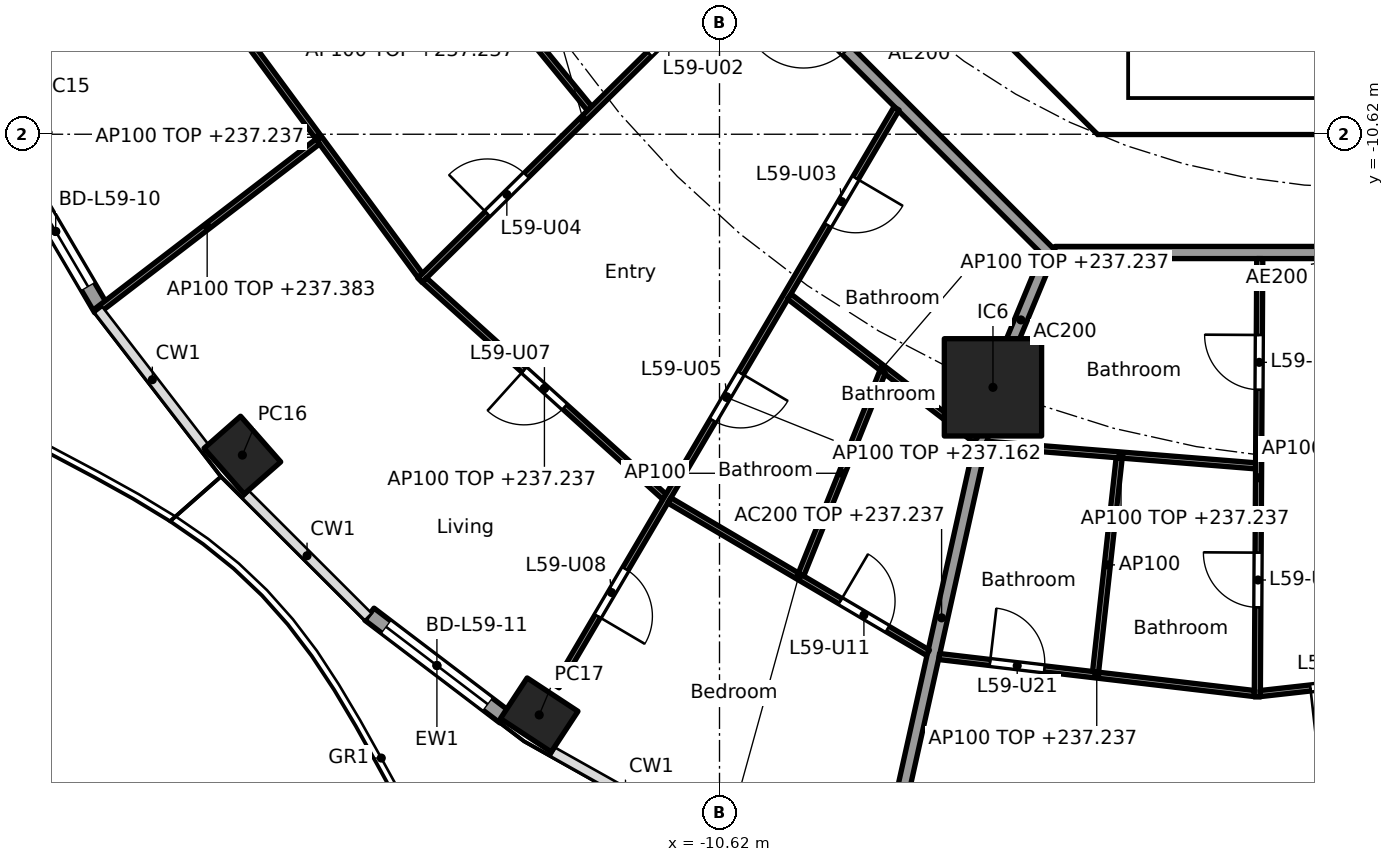
"""IFC4 building model, lengths in metres.
Left out: names, types, materials, properties, quantities, classifications, styles, units other than length and angle.
Written with IfcOpenShell. Run it as: python <this file> out.ifc"""

import sys

from ifc_helpers import new_model, si_unit, direction, frame, frame_2d, origin, origin_2d, place, context, subcontext, project, spatial, polyline, rectangle, hollow_rectangle, outline, extrude, element, fill, save


model = new_model("IFC4")
c1 = context("Model", 3, precision=1e-05, world=origin(), true_north=direction((0.0, 1.0)))
c2 = subcontext(c1, "Body", "Model", "MODEL_VIEW")
j1 = project(units=[si_unit("LENGTHUNIT", "METRE"), si_unit("PLANEANGLEUNIT", "RADIAN")], contexts=[c1])
p1 = place(None, origin())
s1 = spatial("IfcSite", under=j1, at=p1, CompositionType="ELEMENT")
p2 = place(p1, origin())
s2 = spatial("IfcBuilding", under=s1, at=p2, CompositionType="ELEMENT")
p3 = place(p2, frame((0.0, 0.0, 234.4)))
s3 = spatial("IfcBuildingStorey", under=s2, at=p3, CompositionType="ELEMENT", Elevation=234.4)
for number, where, z_axis, x_axis in (
    (1, (-18.467, -15.896, 0.0), (0.0, 0.0, 1.0), (0.66, -0.751, 0.0)),
    (2, (-13.585, -20.17, 0.0), (0.0, 0.0, 1.0), (0.836, -0.549, 0.0)),
):
    element("IfcColumn", number, at=place(p3, frame(where, z_axis=z_axis, x_axis=x_axis)), inside=s3, PredefinedType="COLUMN", context=c2, shape_type="SweptSolid", body=[
        extrude(hollow_rectangle(XDim=1.0, YDim=0.8, WallThickness=0.032, at=origin_2d()), origin(), (0.0, 0.0, 1.0), 3.7),
    ])
p4 = place(p3, frame((-6.123, -14.782, 0.0), z_axis=(0.0, 0.0, 1.0), x_axis=(1.0, 0.0, 0.0)))
e3 = element("IfcColumn", 3, at=p4, inside=s3, PredefinedType="COLUMN", context=c2, shape_type="SweptSolid", body=[
    extrude(rectangle(XDim=1.6, YDim=1.6, at=origin_2d()), origin(), (0.0, 0.0, 1.0), 3.7),
])
p5 = place(p3, frame((-20.788, -13.493, 0.0), z_axis=(0.0, 0.0, 1.0), x_axis=(-0.506294090973, 0.862360883532, 0.0)))
e4 = element("IfcWall", 4, at=p5, inside=s3, PredefinedType="SOLIDWALL", context=c2, shape_type="SweptSolid", body=[
    extrude(rectangle(XDim=2.955, YDim=0.25, at=frame_2d((1.477, 0.0))), origin(), (0.0, 0.0, 1.0), 3.44),
])
p6 = place(p5, frame((0.427, 0.0, 0.0)))
e5 = element("IfcOpeningElement", 5, at=p6, cuts=e4, PredefinedType="OPENING", context=c2, shape_type="SweptSolid", body=[
    extrude(rectangle(XDim=2.1, YDim=2.4, at=frame_2d((1.05, 1.2))), frame((0.0, 0.135, 0.0), z_axis=(0.0, -1.0, 0.0), x_axis=(1.0, 0.0, 0.0)), (0.0, 0.0, 1.0), 0.27),
])
p7 = place(p3, frame((-14.157, -20.201, 0.0), z_axis=(0.0, 0.0, 1.0), x_axis=(-0.795990084031, 0.60530966135, 0.0)))
e6 = element("IfcWall", 6, at=p7, inside=s3, PredefinedType="SOLIDWALL", context=c2, shape_type="SweptSolid", body=[
    extrude(rectangle(XDim=2.789, YDim=0.25, at=frame_2d((1.394, 0.0))), origin(), (0.0, 0.0, 1.0), 3.44),
])
p8 = place(p7, frame((0.344, 0.0, 0.0)))
e7 = element("IfcOpeningElement", 7, at=p8, cuts=e6, PredefinedType="OPENING", context=c2, shape_type="SweptSolid", body=[
    extrude(rectangle(XDim=2.1, YDim=2.4, at=frame_2d((1.05, 1.2))), frame((0.0, 0.135, 0.0), z_axis=(0.0, -1.0, 0.0), x_axis=(1.0, 0.0, 0.0)), (0.0, 0.0, 1.0), 0.27),
])
p9 = place(p3, frame((-9.988, -4.613, 0.0), z_axis=(0.0, 0.0, 1.0), x_axis=(0.707106781187, -0.707106781187, 0.0)))
e8 = element("IfcWall", 8, at=p9, inside=s3, PredefinedType="SHEAR", context=c2, shape_type="SweptSolid", body=[
    extrude(rectangle(XDim=7.602, YDim=0.6, at=frame_2d((3.801, 0.0))), origin(), (0.0, 0.0, 1.0), 3.44),
])
p10 = place(p9, frame((6.151, 0.0, 0.0)))
e9 = element("IfcOpeningElement", 9, at=p10, cuts=e8, PredefinedType="OPENING", context=c2, shape_type="SweptSolid", body=[
    extrude(rectangle(XDim=1.1, YDim=2.1, at=frame_2d((0.55, 1.05))), frame((0.0, 0.31, 0.0), z_axis=(0.0, -1.0, 0.0), x_axis=(1.0, 0.0, 0.0)), (0.0, 0.0, 1.0), 0.62),
])
p11 = place(p3, origin())
e10 = element("IfcWall", 10, at=p11, inside=s3, PredefinedType="SHEAR", context=c2, shape_type="SweptSolid", body=[
    extrude(outline(polyline([(-4.152, -10.025), (4.152, -10.025), (4.401, -9.776), (4.825, -10.2), (4.401, -10.625), (-4.401, -10.625), (-4.825, -10.2), (-4.401, -9.776), (-4.152, -10.025)])), origin(), (0.0, 0.0, 1.0), 3.44),
])
p12 = place(p3, origin())
e11 = element("IfcWall", 11, at=p12, inside=s3, PredefinedType="SOLIDWALL", context=c2, shape_type="SweptSolid", body=[
    extrude(outline(polyline([(-3.9, -10.025), (-4.1, -10.025), (-4.1, -7.025), (-3.9, -7.025), (-3.9, -10.025)])), origin(), (0.0, 0.0, 1.0), 3.44),
])
p13 = place(p3, frame((-5.243, -12.657, 0.0), z_axis=(0.0, 0.0, 1.0), x_axis=(-0.382691608661, -0.923876145736, 0.0)))
e12 = element("IfcWall", 12, at=p13, inside=s3, PredefinedType="PARTITIONING", context=c2, shape_type="SweptSolid", body=[
    extrude(rectangle(XDim=2.2, YDim=0.2, at=frame_2d((1.1, 0.0))), origin(), (0.0, 0.0, 1.0), 3.44),
])
p14 = place(p3, frame((-6.134, -14.831, 0.0), z_axis=(0.0, 0.0, 1.0), x_axis=(-0.217500172543, -0.976060282433, 0.0)))
e13 = element("IfcWall", 13, at=p14, inside=s3, PredefinedType="PARTITIONING", context=c2, shape_type="SweptSolid", body=[
    extrude(rectangle(XDim=7.668, YDim=0.2, at=frame_2d((3.834, 0.0))), origin(), (0.0, 0.0, 1.0), 2.837),
])
p15 = place(p3, frame((-12.635, -5.134, 0.0), z_axis=(0.0, 0.0, 1.0), x_axis=(0.707106781187, -0.707106781187, 0.0)))
e14 = element("IfcWall", 14, at=p15, inside=s3, PredefinedType="PARTITIONING", context=c2, shape_type="SweptSolid", body=[
    extrude(rectangle(XDim=10.609, YDim=0.2, at=frame_2d((5.305, 0.0))), origin(), (0.0, 0.0, 1.0), 3.44),
])
p16 = place(p15, frame((4.804, 0.0, 0.0)))
e15 = element("IfcOpeningElement", 15, at=p16, cuts=e14, PredefinedType="OPENING", context=c2, shape_type="SweptSolid", body=[
    extrude(rectangle(XDim=1.0, YDim=2.1, at=frame_2d((0.5, 1.05))), frame((0.0, 0.11, 0.0), z_axis=(0.0, -1.0, 0.0), x_axis=(1.0, 0.0, 0.0)), (0.0, 0.0, 1.0), 0.22),
])
p17 = place(p3, frame((-5.104, -12.565, 0.0), z_axis=(0.0, 0.0, 1.0), x_axis=(1.0, 0.0, 0.0)))
e16 = element("IfcWall", 16, at=p17, inside=s3, PredefinedType="PARTITIONING", context=c2, shape_type="SweptSolid", body=[
    extrude(rectangle(XDim=10.409, YDim=0.2, at=frame_2d((5.205, 0.0))), origin(), (0.0, 0.0, 1.0), 3.44),
])
p18 = place(p17, frame((4.604, 0.0, 0.0)))
e17 = element("IfcOpeningElement", 17, at=p18, cuts=e16, PredefinedType="OPENING", context=c2, shape_type="SweptSolid", body=[
    extrude(rectangle(XDim=1.0, YDim=2.1, at=frame_2d((0.5, 1.05))), frame((0.0, 0.11, 0.0), z_axis=(0.0, -1.0, 0.0), x_axis=(1.0, 0.0, 0.0)), (0.0, 0.0, 1.0), 0.22),
])
p19 = place(p3, frame((-15.711, -6.593, 0.0), z_axis=(0.0, 0.0, 1.0), x_axis=(0.634058916642, -0.773284740718, 0.0)))
e18 = element("IfcWall", 18, at=p19, inside=s3, PredefinedType="PARTITIONING", context=c2, shape_type="SweptSolid", body=[
    extrude(rectangle(XDim=4.661, YDim=0.1, at=frame_2d((2.331, 0.0))), origin(), (0.0, 0.0, 1.0), 2.837),
])
p20 = place(p3, frame((-18.893, -8.395, 0.0), z_axis=(0.0, 0.0, 1.0), x_axis=(0.593212299255, -0.80504606577, 0.0)))
e19 = element("IfcWall", 19, at=p20, inside=s3, PredefinedType="PARTITIONING", context=c2, shape_type="SweptSolid", body=[
    extrude(rectangle(XDim=5.652, YDim=0.1, at=frame_2d((2.826, 0.0))), origin(), (0.0, 0.0, 1.0), 2.837),
])
p21 = place(p3, frame((-17.227, -10.74, 0.0), z_axis=(0.0, 0.0, 1.0), x_axis=(-0.793312316411, -0.60881488864, 0.0)))
e20 = element("IfcWall", 20, at=p21, inside=s3, PredefinedType="PARTITIONING", context=c2, shape_type="SweptSolid", body=[
    extrude(rectangle(XDim=4.585, YDim=0.1, at=frame_2d((2.292, 0.0))), origin(), (0.0, 0.0, 1.0), 2.983),
])
p22 = place(p3, frame((-10.183, -7.728, 0.0), z_axis=(0.0, 0.0, 1.0), x_axis=(-0.711869910979, -0.702311348223, 0.0)))
e21 = element("IfcWall", 21, at=p22, inside=s3, PredefinedType="PARTITIONING", context=c2, shape_type="SweptSolid", body=[
    extrude(rectangle(XDim=7.535, YDim=0.1, at=frame_2d((3.767, 0.0))), origin(), (0.0, 0.0, 1.0), 2.762),
])
p23 = place(p22, frame((1.335, 0.0, 0.0)))
e22 = element("IfcOpeningElement", 22, at=p23, cuts=e21, PredefinedType="OPENING", context=c2, shape_type="SweptSolid", body=[
    extrude(rectangle(XDim=0.9, YDim=2.1, at=frame_2d((0.45, 1.05))), frame((0.0, 0.06, 0.0), z_axis=(0.0, -1.0, 0.0), x_axis=(1.0, 0.0, 0.0)), (0.0, 0.0, 1.0), 0.12),
])
p24 = place(p22, frame((5.077, 0.0, 0.0)))
e23 = element("IfcOpeningElement", 23, at=p24, cuts=e21, PredefinedType="OPENING", context=c2, shape_type="SweptSolid", body=[
    extrude(rectangle(XDim=0.9, YDim=2.1, at=frame_2d((0.45, 1.05))), frame((0.0, 0.06, 0.0), z_axis=(0.0, -1.0, 0.0), x_axis=(1.0, 0.0, 0.0)), (0.0, 0.0, 1.0), 0.12),
])
p25 = place(p3, frame((-15.474, -13.019, 0.0), z_axis=(0.0, 0.0, 1.0), x_axis=(0.742348572616, -0.670013878017, 0.0)))
e24 = element("IfcWall", 24, at=p25, inside=s3, PredefinedType="PARTITIONING", context=c2, shape_type="SweptSolid", body=[
    extrude(rectangle(XDim=5.319, YDim=0.1, at=frame_2d((2.66, 0.0))), origin(), (0.0, 0.0, 1.0), 2.837),
])
p26 = place(p25, frame((2.21, 0.0, 0.0)))
e25 = element("IfcOpeningElement", 25, at=p26, cuts=e24, PredefinedType="OPENING", context=c2, shape_type="SweptSolid", body=[
    extrude(rectangle(XDim=0.9, YDim=2.1, at=frame_2d((0.45, 1.05))), frame((0.0, 0.06, 0.0), z_axis=(0.0, -1.0, 0.0), x_axis=(1.0, 0.0, 0.0)), (0.0, 0.0, 1.0), 0.12),
])
p27 = place(p3, frame((-7.709, -10.198, 0.0), z_axis=(0.0, 0.0, 1.0), x_axis=(-0.507355901053, -0.8617366127, 0.0)))
e26 = element("IfcWall", 26, at=p27, inside=s3, PredefinedType="PARTITIONING", context=c2, shape_type="SweptSolid", body=[
    extrude(rectangle(XDim=11.025, YDim=0.1, at=frame_2d((5.512, 0.0))), origin(), (0.0, 0.0, 1.0), 2.762),
])
p28 = place(p27, frame((1.326, 0.0, 0.0)))
e27 = element("IfcOpeningElement", 27, at=p28, cuts=e26, PredefinedType="OPENING", context=c2, shape_type="SweptSolid", body=[
    extrude(rectangle(XDim=0.9, YDim=2.1, at=frame_2d((0.45, 1.05))), frame((0.0, 0.06, 0.0), z_axis=(0.0, -1.0, 0.0), x_axis=(1.0, 0.0, 0.0)), (0.0, 0.0, 1.0), 0.12),
])
p29 = place(p27, frame((5.05, 0.0, 0.0)))
e28 = element("IfcOpeningElement", 28, at=p29, cuts=e26, PredefinedType="OPENING", context=c2, shape_type="SweptSolid", body=[
    extrude(rectangle(XDim=0.9, YDim=2.1, at=frame_2d((0.45, 1.05))), frame((0.0, 0.06, 0.0), z_axis=(0.0, -1.0, 0.0), x_axis=(1.0, 0.0, 0.0)), (0.0, 0.0, 1.0), 0.12),
])
p30 = place(p27, frame((8.787, 0.0, 0.0)))
e29 = element("IfcOpeningElement", 29, at=p30, cuts=e26, PredefinedType="OPENING", context=c2, shape_type="SweptSolid", body=[
    extrude(rectangle(XDim=0.9, YDim=2.1, at=frame_2d((0.45, 1.05))), frame((0.0, 0.06, 0.0), z_axis=(0.0, -1.0, 0.0), x_axis=(1.0, 0.0, 0.0)), (0.0, 0.0, 1.0), 0.12),
])
p31 = place(p3, frame((-9.471, -13.289, 0.0), z_axis=(0.0, 0.0, 1.0), x_axis=(0.792227074489, -0.610226402614, 0.0)))
e30 = element("IfcWall", 30, at=p31, inside=s3, PredefinedType="PARTITIONING", context=c2, shape_type="SweptSolid", body=[
    extrude(rectangle(XDim=3.866, YDim=0.1, at=frame_2d((1.933, 0.0))), origin(), (0.0, 0.0, 1.0), 2.837),
])
p32 = place(p3, frame((-11.445, -16.641, 0.0), z_axis=(0.0, 0.0, 1.0), x_axis=(0.861568986754, -0.507640503766, 0.0)))
e31 = element("IfcWall", 31, at=p32, inside=s3, PredefinedType="PARTITIONING", context=c2, shape_type="SweptSolid", body=[
    extrude(rectangle(XDim=4.935, YDim=0.1, at=frame_2d((2.467, 0.0))), origin(), (0.0, 0.0, 1.0), 2.837),
])
p33 = place(p32, frame((3.264, 0.0, 0.0)))
e32 = element("IfcOpeningElement", 32, at=p33, cuts=e31, PredefinedType="OPENING", context=c2, shape_type="SweptSolid", body=[
    extrude(rectangle(XDim=0.9, YDim=2.1, at=frame_2d((0.45, 1.05))), frame((0.0, 0.06, 0.0), z_axis=(0.0, -1.0, 0.0), x_axis=(1.0, 0.0, 0.0)), (0.0, 0.0, 1.0), 0.12),
])
p34 = place(p3, frame((-7.939, -14.531, 0.0), z_axis=(0.0, 0.0, 1.0), x_axis=(-0.373254758443, -0.927728885666, 0.0)))
e33 = element("IfcWall", 33, at=p34, inside=s3, PredefinedType="PARTITIONING", context=c2, shape_type="SweptSolid", body=[
    extrude(rectangle(XDim=3.589, YDim=0.1, at=frame_2d((1.794, 0.0))), origin(), (0.0, 0.0, 1.0), 3.44),
])
p35 = place(p3, frame((-6.23, -15.717, 0.0), z_axis=(0.0, 0.0, 1.0), x_axis=(0.996785662802, -0.080114558181, 0.0)))
e34 = element("IfcWall", 34, at=p35, inside=s3, PredefinedType="PARTITIONING", context=c2, shape_type="SweptSolid", body=[
    extrude(rectangle(XDim=4.44, YDim=0.1, at=frame_2d((2.22, 0.0))), origin(), (0.0, 0.0, 1.0), 2.837),
])
p36 = place(p3, frame((-7.008, -19.209, 0.0), z_axis=(0.0, 0.0, 1.0), x_axis=(0.993174535364, -0.116637653885, 0.0)))
e35 = element("IfcWall", 35, at=p36, inside=s3, PredefinedType="PARTITIONING", context=c2, shape_type="SweptSolid", body=[
    extrude(rectangle(XDim=5.218, YDim=0.1, at=frame_2d((2.609, 0.0))), origin(), (0.0, 0.0, 1.0), 2.837),
])
p37 = place(p36, frame((0.842, 0.0, 0.0)))
e36 = element("IfcOpeningElement", 36, at=p37, cuts=e35, PredefinedType="OPENING", context=c2, shape_type="SweptSolid", body=[
    extrude(rectangle(XDim=0.9, YDim=2.1, at=frame_2d((0.45, 1.05))), frame((0.0, 0.06, 0.0), z_axis=(0.0, -1.0, 0.0), x_axis=(1.0, 0.0, 0.0)), (0.0, 0.0, 1.0), 0.12),
])
p38 = place(p3, frame((-4.047, -15.943, 0.0), z_axis=(0.0, 0.0, 1.0), x_axis=(-0.109681942509, -0.993966735604, 0.0)))
e37 = element("IfcWall", 37, at=p38, inside=s3, PredefinedType="PARTITIONING", context=c2, shape_type="SweptSolid", body=[
    extrude(rectangle(XDim=3.539, YDim=0.1, at=frame_2d((1.77, 0.0))), origin(), (0.0, 0.0, 1.0), 3.44),
])
p39 = place(p3, frame((-1.735, -12.665, 0.0), z_axis=(0.0, 0.0, 1.0), x_axis=(-0.005554152823, -0.999984575574, 0.0)))
e38 = element("IfcWall", 38, at=p39, inside=s3, PredefinedType="PARTITIONING", context=c2, shape_type="SweptSolid", body=[
    extrude(rectangle(XDim=7.209, YDim=0.1, at=frame_2d((3.604, 0.0))), origin(), (0.0, 0.0, 1.0), 2.762),
])
p40 = place(p39, frame((1.256, 0.0, 0.0)))
e39 = element("IfcOpeningElement", 39, at=p40, cuts=e38, PredefinedType="OPENING", context=c2, shape_type="SweptSolid", body=[
    extrude(rectangle(XDim=0.9, YDim=2.1, at=frame_2d((0.45, 1.05))), frame((0.0, 0.06, 0.0), z_axis=(0.0, -1.0, 0.0), x_axis=(1.0, 0.0, 0.0)), (0.0, 0.0, 1.0), 0.12),
])
p41 = place(p39, frame((4.836, 0.0, 0.0)))
e40 = element("IfcOpeningElement", 40, at=p41, cuts=e38, PredefinedType="OPENING", context=c2, shape_type="SweptSolid", body=[
    extrude(rectangle(XDim=0.9, YDim=2.1, at=frame_2d((0.45, 1.05))), frame((0.0, 0.06, 0.0), z_axis=(0.0, -1.0, 0.0), x_axis=(1.0, 0.0, 0.0)), (0.0, 0.0, 1.0), 0.12),
])
p42 = place(p3, frame((-1.726, -19.818, 0.0), z_axis=(0.0, 0.0, 1.0), x_axis=(0.99381893047, 0.111013212902, 0.0)))
e41 = element("IfcWall", 41, at=p42, inside=s3, PredefinedType="PARTITIONING", context=c2, shape_type="SweptSolid", body=[
    extrude(rectangle(XDim=5.113, YDim=0.1, at=frame_2d((2.557, 0.0))), origin(), (0.0, 0.0, 1.0), 2.837),
])
p43 = place(p42, frame((0.828, 0.0, 0.0)))
e42 = element("IfcOpeningElement", 42, at=p43, cuts=e41, PredefinedType="OPENING", context=c2, shape_type="SweptSolid", body=[
    extrude(rectangle(XDim=0.9, YDim=2.1, at=frame_2d((0.45, 1.05))), frame((0.0, 0.06, 0.0), z_axis=(0.0, -1.0, 0.0), x_axis=(1.0, 0.0, 0.0)), (0.0, 0.0, 1.0), 0.12),
])
p44 = place(p6, origin())
e43 = element("IfcDoor", 43, at=p44, inside=s3, OperationType="SLIDING_TO_LEFT", PredefinedType="DOOR", context=c2, shape_type="SweptSolid", body=[
    extrude(rectangle(XDim=2.1, YDim=2.4, at=frame_2d((1.05, 1.2))), frame((0.0, 0.025, 0.0), z_axis=(0.0, -1.0, 0.0), x_axis=(1.0, 0.0, 0.0)), (0.0, 0.0, 1.0), 0.05),
])
fill(e5, e43)
p45 = place(p8, origin())
e44 = element("IfcDoor", 44, at=p45, inside=s3, OperationType="SLIDING_TO_LEFT", PredefinedType="DOOR", context=c2, shape_type="SweptSolid", body=[
    extrude(rectangle(XDim=2.1, YDim=2.4, at=frame_2d((1.05, 1.2))), frame((0.0, 0.025, 0.0), z_axis=(0.0, -1.0, 0.0), x_axis=(1.0, 0.0, 0.0)), (0.0, 0.0, 1.0), 0.05),
])
fill(e7, e44)
p46 = place(p10, origin())
e45 = element("IfcDoor", 45, at=p46, inside=s3, OperationType="SINGLE_SWING_LEFT", PredefinedType="DOOR", context=c2, shape_type="SweptSolid", body=[
    extrude(rectangle(XDim=1.1, YDim=2.1, at=frame_2d((0.55, 1.05))), frame((0.0, 0.025, 0.0), z_axis=(0.0, -1.0, 0.0), x_axis=(1.0, 0.0, 0.0)), (0.0, 0.0, 1.0), 0.05),
])
fill(e9, e45)
p47 = place(p23, frame((0.9, 0.0, 0.0), x_axis=(-1.0, 0.0, 0.0)))
e46 = element("IfcDoor", 46, at=p47, inside=s3, OperationType="SINGLE_SWING_LEFT", PredefinedType="DOOR", context=c2, shape_type="SweptSolid", body=[
    extrude(rectangle(XDim=0.9, YDim=2.1, at=frame_2d((0.45, 1.05))), frame((0.0, 0.025, 0.0), z_axis=(0.0, -1.0, 0.0), x_axis=(1.0, 0.0, 0.0)), (0.0, 0.0, 1.0), 0.05),
])
fill(e22, e46)
p48 = place(p28, origin())
e47 = element("IfcDoor", 47, at=p48, inside=s3, OperationType="SINGLE_SWING_LEFT", PredefinedType="DOOR", context=c2, shape_type="SweptSolid", body=[
    extrude(rectangle(XDim=0.9, YDim=2.1, at=frame_2d((0.45, 1.05))), frame((0.0, 0.025, 0.0), z_axis=(0.0, -1.0, 0.0), x_axis=(1.0, 0.0, 0.0)), (0.0, 0.0, 1.0), 0.05),
])
fill(e27, e47)
p49 = place(p24, frame((0.9, 0.0, 0.0), x_axis=(-1.0, 0.0, 0.0)))
e48 = element("IfcDoor", 48, at=p49, inside=s3, OperationType="SINGLE_SWING_LEFT", PredefinedType="DOOR", context=c2, shape_type="SweptSolid", body=[
    extrude(rectangle(XDim=0.9, YDim=2.1, at=frame_2d((0.45, 1.05))), frame((0.0, 0.025, 0.0), z_axis=(0.0, -1.0, 0.0), x_axis=(1.0, 0.0, 0.0)), (0.0, 0.0, 1.0), 0.05),
])
fill(e23, e48)
p50 = place(p29, origin())
e49 = element("IfcDoor", 49, at=p50, inside=s3, OperationType="SINGLE_SWING_LEFT", PredefinedType="DOOR", context=c2, shape_type="SweptSolid", body=[
    extrude(rectangle(XDim=0.9, YDim=2.1, at=frame_2d((0.45, 1.05))), frame((0.0, 0.025, 0.0), z_axis=(0.0, -1.0, 0.0), x_axis=(1.0, 0.0, 0.0)), (0.0, 0.0, 1.0), 0.05),
])
fill(e28, e49)
p51 = place(p26, frame((0.9, 0.0, 0.0), x_axis=(-1.0, 0.0, 0.0)))
e50 = element("IfcDoor", 50, at=p51, inside=s3, OperationType="SINGLE_SWING_RIGHT", PredefinedType="DOOR", context=c2, shape_type="SweptSolid", body=[
    extrude(rectangle(XDim=0.9, YDim=2.1, at=frame_2d((0.45, 1.05))), frame((0.0, 0.025, 0.0), z_axis=(0.0, -1.0, 0.0), x_axis=(1.0, 0.0, 0.0)), (0.0, 0.0, 1.0), 0.05),
])
fill(e25, e50)
p52 = place(p30, origin())
e51 = element("IfcDoor", 51, at=p52, inside=s3, OperationType="SINGLE_SWING_RIGHT", PredefinedType="DOOR", context=c2, shape_type="SweptSolid", body=[
    extrude(rectangle(XDim=0.9, YDim=2.1, at=frame_2d((0.45, 1.05))), frame((0.0, 0.025, 0.0), z_axis=(0.0, -1.0, 0.0), x_axis=(1.0, 0.0, 0.0)), (0.0, 0.0, 1.0), 0.05),
])
fill(e29, e51)
p53 = place(p33, origin())
e52 = element("IfcDoor", 52, at=p53, inside=s3, OperationType="SINGLE_SWING_LEFT", PredefinedType="DOOR", context=c2, shape_type="SweptSolid", body=[
    extrude(rectangle(XDim=0.9, YDim=2.1, at=frame_2d((0.45, 1.05))), frame((0.0, 0.025, 0.0), z_axis=(0.0, -1.0, 0.0), x_axis=(1.0, 0.0, 0.0)), (0.0, 0.0, 1.0), 0.05),
])
fill(e32, e52)
p54 = place(p40, frame((0.9, 0.0, 0.0), x_axis=(-1.0, 0.0, 0.0)))
e53 = element("IfcDoor", 53, at=p54, inside=s3, OperationType="SINGLE_SWING_RIGHT", PredefinedType="DOOR", context=c2, shape_type="SweptSolid", body=[
    extrude(rectangle(XDim=0.9, YDim=2.1, at=frame_2d((0.45, 1.05))), frame((0.0, 0.025, 0.0), z_axis=(0.0, -1.0, 0.0), x_axis=(1.0, 0.0, 0.0)), (0.0, 0.0, 1.0), 0.05),
])
fill(e39, e53)
p55 = place(p41, frame((0.9, 0.0, 0.0), x_axis=(-1.0, 0.0, 0.0)))
e54 = element("IfcDoor", 54, at=p55, inside=s3, OperationType="SINGLE_SWING_RIGHT", PredefinedType="DOOR", context=c2, shape_type="SweptSolid", body=[
    extrude(rectangle(XDim=0.9, YDim=2.1, at=frame_2d((0.45, 1.05))), frame((0.0, 0.025, 0.0), z_axis=(0.0, -1.0, 0.0), x_axis=(1.0, 0.0, 0.0)), (0.0, 0.0, 1.0), 0.05),
])
fill(e40, e54)
p56 = place(p43, frame((0.9, 0.0, 0.0), x_axis=(-1.0, 0.0, 0.0)))
e55 = element("IfcDoor", 55, at=p56, inside=s3, OperationType="SINGLE_SWING_RIGHT", PredefinedType="DOOR", context=c2, shape_type="SweptSolid", body=[
    extrude(rectangle(XDim=0.9, YDim=2.1, at=frame_2d((0.45, 1.05))), frame((0.0, 0.025, 0.0), z_axis=(0.0, -1.0, 0.0), x_axis=(1.0, 0.0, 0.0)), (0.0, 0.0, 1.0), 0.05),
])
fill(e42, e55)
p57 = place(p37, origin())
e56 = element("IfcDoor", 56, at=p57, inside=s3, OperationType="SINGLE_SWING_LEFT", PredefinedType="DOOR", context=c2, shape_type="SweptSolid", body=[
    extrude(rectangle(XDim=0.9, YDim=2.1, at=frame_2d((0.45, 1.05))), frame((0.0, 0.025, 0.0), z_axis=(0.0, -1.0, 0.0), x_axis=(1.0, 0.0, 0.0)), (0.0, 0.0, 1.0), 0.05),
])
fill(e36, e56)
save(model, sys.argv[1])
